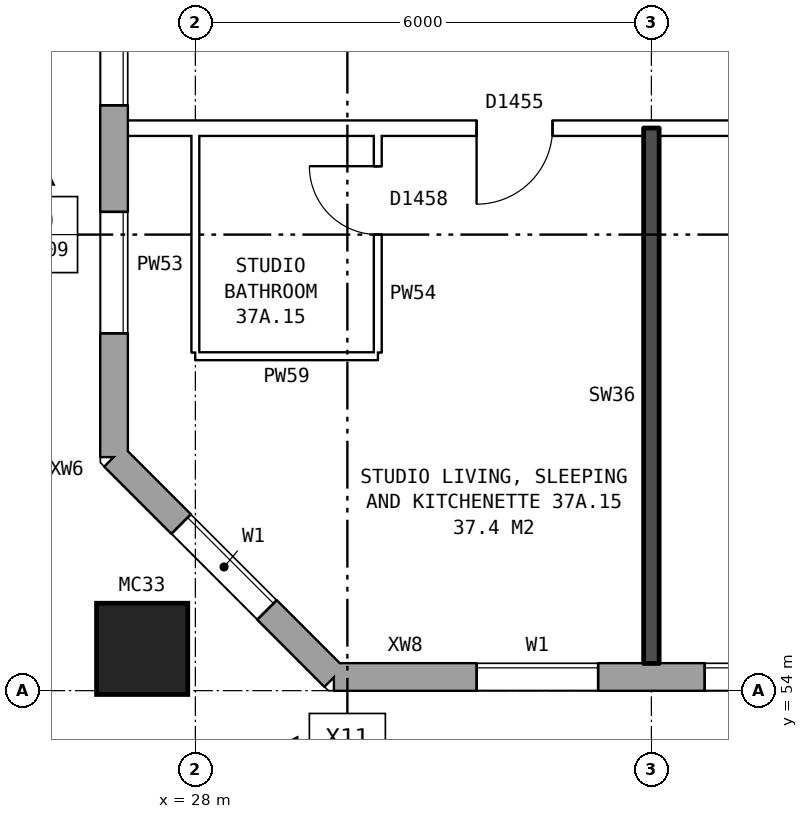
"""IFC4 building model, lengths in metres.
Left out: names, types, materials, properties, quantities, classifications, styles, units other than length and angle.
Written with IfcOpenShell. Run it as: python <this file> out.ifc"""

import sys

from ifc_helpers import new_model, si_unit, direction, frame, frame_2d, origin, origin_2d, place, context, subcontext, project, spatial, rectangle, hollow_rectangle, extrude, element, fill, save


model = new_model("IFC4")
c1 = context("Model", 3, precision=1e-05, world=origin(), true_north=direction((0.0, 1.0)))
c2 = subcontext(c1, "Body", "Model", "MODEL_VIEW")
j1 = project(units=[si_unit("LENGTHUNIT", "METRE"), si_unit("PLANEANGLEUNIT", "RADIAN")], contexts=[c1])
p1 = place(None, origin())
s1 = spatial("IfcSite", under=j1, at=p1, CompositionType="ELEMENT")
p2 = place(p1, origin())
s2 = spatial("IfcBuilding", under=s1, at=p2, CompositionType="ELEMENT")
p3 = place(p2, frame((0.0, 0.0, 133.0)))
s3 = spatial("IfcBuildingStorey", under=s2, at=p3, CompositionType="ELEMENT", Elevation=133.0)
p4 = place(p3, frame((27.3, 54.55, 0.0), z_axis=(0.0, 0.0, 1.0), x_axis=(1.0, 0.0, 0.0)))
e1 = element("IfcColumn", 1, at=p4, inside=s3, PredefinedType="COLUMN", context=c2, shape_type="SweptSolid", body=[
    extrude(hollow_rectangle(XDim=1.2, YDim=1.2, WallThickness=0.065, at=origin_2d()), origin(), (0.0, 0.0, 1.0), 3.1),
])
p5 = place(p3, frame((26.93, 57.075, 0.0), z_axis=(0.0, 0.0, 1.0), x_axis=(0.707106781187, -0.707106781187, 0.0)))
e2 = element("IfcWall", 2, at=p5, inside=s3, PredefinedType="STANDARD", context=c2, shape_type="SweptSolid", body=[
    extrude(rectangle(XDim=4.094, YDim=0.36, at=frame_2d((2.047, 0.0))), origin(), (0.0, 0.0, 1.0), 2.85),
])
p6 = place(p5, frame((1.247, 0.0, 0.8)))
e3 = element("IfcOpeningElement", 3, at=p6, cuts=e2, PredefinedType="OPENING", context=c2, shape_type="SweptSolid", body=[
    extrude(rectangle(XDim=1.6, YDim=1.8, at=frame_2d((0.8, 0.9))), frame((0.0, 0.19, 0.0), z_axis=(0.0, -1.0, 0.0), x_axis=(1.0, 0.0, 0.0)), (0.0, 0.0, 1.0), 0.38),
])
p7 = place(p3, frame((29.825, 54.18, 0.0), z_axis=(0.0, 0.0, 1.0), x_axis=(1.0, 0.0, 0.0)))
e4 = element("IfcWall", 4, at=p7, inside=s3, PredefinedType="STANDARD", context=c2, shape_type="SweptSolid", body=[
    extrude(rectangle(XDim=43.101, YDim=0.36, at=frame_2d((21.55, 0.0))), origin(), (0.0, 0.0, 1.0), 2.85),
])
p8 = place(p7, frame((1.875, 0.0, 0.8)))
e5 = element("IfcOpeningElement", 5, at=p8, cuts=e4, PredefinedType="OPENING", context=c2, shape_type="SweptSolid", body=[
    extrude(rectangle(XDim=1.6, YDim=1.8, at=frame_2d((0.8, 0.9))), frame((0.0, 0.19, 0.0), z_axis=(0.0, -1.0, 0.0), x_axis=(1.0, 0.0, 0.0)), (0.0, 0.0, 1.0), 0.38),
])
p9 = place(p7, frame((4.875, 0.0, 0.8)))
e6 = element("IfcOpeningElement", 6, at=p9, cuts=e4, PredefinedType="OPENING", context=c2, shape_type="SweptSolid", body=[
    extrude(rectangle(XDim=1.6, YDim=1.8, at=frame_2d((0.8, 0.9))), frame((0.0, 0.19, 0.0), z_axis=(0.0, -1.0, 0.0), x_axis=(1.0, 0.0, 0.0)), (0.0, 0.0, 1.0), 0.38),
])
p10 = place(p7, frame((7.875, 0.0, 0.8)))
e7 = element("IfcOpeningElement", 7, at=p10, cuts=e4, PredefinedType="OPENING", context=c2, shape_type="SweptSolid", body=[
    extrude(rectangle(XDim=1.6, YDim=1.8, at=frame_2d((0.8, 0.9))), frame((0.0, 0.19, 0.0), z_axis=(0.0, -1.0, 0.0), x_axis=(1.0, 0.0, 0.0)), (0.0, 0.0, 1.0), 0.38),
])
p11 = place(p7, frame((10.875, 0.0, 0.8)))
e8 = element("IfcOpeningElement", 8, at=p11, cuts=e4, PredefinedType="OPENING", context=c2, shape_type="SweptSolid", body=[
    extrude(rectangle(XDim=1.6, YDim=1.8, at=frame_2d((0.8, 0.9))), frame((0.0, 0.19, 0.0), z_axis=(0.0, -1.0, 0.0), x_axis=(1.0, 0.0, 0.0)), (0.0, 0.0, 1.0), 0.38),
])
p12 = place(p7, frame((14.275, 0.0, 0.8)))
e9 = element("IfcOpeningElement", 9, at=p12, cuts=e4, PredefinedType="OPENING", context=c2, shape_type="SweptSolid", body=[
    extrude(rectangle(XDim=0.8, YDim=0.9, at=frame_2d((0.4, 0.45))), frame((0.0, 0.19, 0.0), z_axis=(0.0, -1.0, 0.0), x_axis=(1.0, 0.0, 0.0)), (0.0, 0.0, 1.0), 0.38),
])
p13 = place(p7, frame((16.875, 0.0, 0.8)))
e10 = element("IfcOpeningElement", 10, at=p13, cuts=e4, PredefinedType="OPENING", context=c2, shape_type="SweptSolid", body=[
    extrude(rectangle(XDim=1.6, YDim=1.8, at=frame_2d((0.8, 0.9))), frame((0.0, 0.19, 0.0), z_axis=(0.0, -1.0, 0.0), x_axis=(1.0, 0.0, 0.0)), (0.0, 0.0, 1.0), 0.38),
])
p14 = place(p7, frame((19.875, 0.0, 0.8)))
e11 = element("IfcOpeningElement", 11, at=p14, cuts=e4, PredefinedType="OPENING", context=c2, shape_type="SweptSolid", body=[
    extrude(rectangle(XDim=1.6, YDim=1.8, at=frame_2d((0.8, 0.9))), frame((0.0, 0.19, 0.0), z_axis=(0.0, -1.0, 0.0), x_axis=(1.0, 0.0, 0.0)), (0.0, 0.0, 1.0), 0.38),
])
p15 = place(p7, frame((22.875, 0.0, 0.8)))
e12 = element("IfcOpeningElement", 12, at=p15, cuts=e4, PredefinedType="OPENING", context=c2, shape_type="SweptSolid", body=[
    extrude(rectangle(XDim=1.6, YDim=1.8, at=frame_2d((0.8, 0.9))), frame((0.0, 0.19, 0.0), z_axis=(0.0, -1.0, 0.0), x_axis=(1.0, 0.0, 0.0)), (0.0, 0.0, 1.0), 0.38),
])
p16 = place(p7, frame((25.875, 0.0, 0.8)))
e13 = element("IfcOpeningElement", 13, at=p16, cuts=e4, PredefinedType="OPENING", context=c2, shape_type="SweptSolid", body=[
    extrude(rectangle(XDim=1.6, YDim=1.8, at=frame_2d((0.8, 0.9))), frame((0.0, 0.19, 0.0), z_axis=(0.0, -1.0, 0.0), x_axis=(1.0, 0.0, 0.0)), (0.0, 0.0, 1.0), 0.38),
])
p17 = place(p7, frame((28.375, 0.0, 0.25)))
e14 = element("IfcOpeningElement", 14, at=p17, cuts=e4, PredefinedType="OPENING", context=c2, shape_type="SweptSolid", body=[
    extrude(rectangle(XDim=1.0, YDim=0.9, at=frame_2d((0.5, 0.45))), frame((0.0, 0.19, 0.0), z_axis=(0.0, -1.0, 0.0), x_axis=(1.0, 0.0, 0.0)), (0.0, 0.0, 1.0), 0.38),
])
p18 = place(p7, frame((31.875, 0.0, 0.8)))
e15 = element("IfcOpeningElement", 15, at=p18, cuts=e4, PredefinedType="OPENING", context=c2, shape_type="SweptSolid", body=[
    extrude(rectangle(XDim=1.6, YDim=1.8, at=frame_2d((0.8, 0.9))), frame((0.0, 0.19, 0.0), z_axis=(0.0, -1.0, 0.0), x_axis=(1.0, 0.0, 0.0)), (0.0, 0.0, 1.0), 0.38),
])
p19 = place(p7, frame((34.875, 0.0, 0.8)))
e16 = element("IfcOpeningElement", 16, at=p19, cuts=e4, PredefinedType="OPENING", context=c2, shape_type="SweptSolid", body=[
    extrude(rectangle(XDim=1.6, YDim=1.8, at=frame_2d((0.8, 0.9))), frame((0.0, 0.19, 0.0), z_axis=(0.0, -1.0, 0.0), x_axis=(1.0, 0.0, 0.0)), (0.0, 0.0, 1.0), 0.38),
])
p20 = place(p7, frame((37.875, 0.0, 0.8)))
e17 = element("IfcOpeningElement", 17, at=p20, cuts=e4, PredefinedType="OPENING", context=c2, shape_type="SweptSolid", body=[
    extrude(rectangle(XDim=1.6, YDim=1.8, at=frame_2d((0.8, 0.9))), frame((0.0, 0.19, 0.0), z_axis=(0.0, -1.0, 0.0), x_axis=(1.0, 0.0, 0.0)), (0.0, 0.0, 1.0), 0.38),
])
p21 = place(p7, frame((40.875, 0.0, 0.8)))
e18 = element("IfcOpeningElement", 18, at=p21, cuts=e4, PredefinedType="OPENING", context=c2, shape_type="SweptSolid", body=[
    extrude(rectangle(XDim=1.6, YDim=1.8, at=frame_2d((0.8, 0.9))), frame((0.0, 0.19, 0.0), z_axis=(0.0, -1.0, 0.0), x_axis=(1.0, 0.0, 0.0)), (0.0, 0.0, 1.0), 0.38),
])
p22 = place(p7, frame((15.375, 0.0, 0.8)))
e19 = element("IfcOpeningElement", 19, at=p22, cuts=e4, PredefinedType="OPENING", context=c2, shape_type="SweptSolid", body=[
    extrude(rectangle(XDim=0.6, YDim=1.8, at=frame_2d((0.3, 0.9))), frame((0.0, 0.19, 0.0), z_axis=(0.0, -1.0, 0.0), x_axis=(1.0, 0.0, 0.0)), (0.0, 0.0, 1.0), 0.38),
])
p23 = place(p7, frame((30.025, 0.0, 1.65)))
e20 = element("IfcOpeningElement", 20, at=p23, cuts=e4, PredefinedType="OPENING", context=c2, shape_type="SweptSolid", body=[
    extrude(rectangle(XDim=1.0, YDim=0.9, at=frame_2d((0.5, 0.45))), frame((0.0, 0.19, 0.0), z_axis=(0.0, -1.0, 0.0), x_axis=(1.0, 0.0, 0.0)), (0.0, 0.0, 1.0), 0.38),
])
p24 = place(p3, frame((26.93, 82.925, 0.0), z_axis=(0.0, 0.0, 1.0), x_axis=(0.0, -1.0, 0.0)))
e21 = element("IfcWall", 21, at=p24, inside=s3, PredefinedType="STANDARD", context=c2, shape_type="SweptSolid", body=[
    extrude(rectangle(XDim=25.851, YDim=0.36, at=frame_2d((12.925, 0.0))), origin(), (0.0, 0.0, 1.0), 2.85),
])
p25 = place(p24, frame((1.625, 0.0, 0.8)))
e22 = element("IfcOpeningElement", 22, at=p25, cuts=e21, PredefinedType="OPENING", context=c2, shape_type="SweptSolid", body=[
    extrude(rectangle(XDim=1.6, YDim=1.8, at=frame_2d((0.8, 0.9))), frame((0.0, 0.19, 0.0), z_axis=(0.0, -1.0, 0.0), x_axis=(1.0, 0.0, 0.0)), (0.0, 0.0, 1.0), 0.38),
])
p26 = place(p24, frame((4.625, 0.0, 0.8)))
e23 = element("IfcOpeningElement", 23, at=p26, cuts=e21, PredefinedType="OPENING", context=c2, shape_type="SweptSolid", body=[
    extrude(rectangle(XDim=1.6, YDim=1.8, at=frame_2d((0.8, 0.9))), frame((0.0, 0.19, 0.0), z_axis=(0.0, -1.0, 0.0), x_axis=(1.0, 0.0, 0.0)), (0.0, 0.0, 1.0), 0.38),
])
p27 = place(p24, frame((8.025, 0.0, 1.7)))
e24 = element("IfcOpeningElement", 24, at=p27, cuts=e21, PredefinedType="OPENING", context=c2, shape_type="SweptSolid", body=[
    extrude(rectangle(XDim=1.0, YDim=0.9, at=frame_2d((0.5, 0.45))), frame((0.0, 0.19, 0.0), z_axis=(0.0, -1.0, 0.0), x_axis=(1.0, 0.0, 0.0)), (0.0, 0.0, 1.0), 0.38),
])
p28 = place(p24, frame((10.625, 0.0, 0.8)))
e25 = element("IfcOpeningElement", 25, at=p28, cuts=e21, PredefinedType="OPENING", context=c2, shape_type="SweptSolid", body=[
    extrude(rectangle(XDim=1.6, YDim=1.8, at=frame_2d((0.8, 0.9))), frame((0.0, 0.19, 0.0), z_axis=(0.0, -1.0, 0.0), x_axis=(1.0, 0.0, 0.0)), (0.0, 0.0, 1.0), 0.38),
])
p29 = place(p24, frame((13.625, 0.0, 0.8)))
e26 = element("IfcOpeningElement", 26, at=p29, cuts=e21, PredefinedType="OPENING", context=c2, shape_type="SweptSolid", body=[
    extrude(rectangle(XDim=1.6, YDim=1.8, at=frame_2d((0.8, 0.9))), frame((0.0, 0.19, 0.0), z_axis=(0.0, -1.0, 0.0), x_axis=(1.0, 0.0, 0.0)), (0.0, 0.0, 1.0), 0.38),
])
p30 = place(p24, frame((9.325, 0.0, 0.8)))
e27 = element("IfcOpeningElement", 27, at=p30, cuts=e21, PredefinedType="OPENING", context=c2, shape_type="SweptSolid", body=[
    extrude(rectangle(XDim=1.0, YDim=1.8, at=frame_2d((0.5, 0.9))), frame((0.0, 0.19, 0.0), z_axis=(0.0, -1.0, 0.0), x_axis=(1.0, 0.0, 0.0)), (0.0, 0.0, 1.0), 0.38),
])
p31 = place(p24, frame((19.625, 0.0, 0.8)))
e28 = element("IfcOpeningElement", 28, at=p31, cuts=e21, PredefinedType="OPENING", context=c2, shape_type="SweptSolid", body=[
    extrude(rectangle(XDim=1.6, YDim=1.8, at=frame_2d((0.8, 0.9))), frame((0.0, 0.19, 0.0), z_axis=(0.0, -1.0, 0.0), x_axis=(1.0, 0.0, 0.0)), (0.0, 0.0, 1.0), 0.38),
])
p32 = place(p24, frame((22.625, 0.0, 0.8)))
e29 = element("IfcOpeningElement", 29, at=p32, cuts=e21, PredefinedType="OPENING", context=c2, shape_type="SweptSolid", body=[
    extrude(rectangle(XDim=1.6, YDim=1.8, at=frame_2d((0.8, 0.9))), frame((0.0, 0.19, 0.0), z_axis=(0.0, -1.0, 0.0), x_axis=(1.0, 0.0, 0.0)), (0.0, 0.0, 1.0), 0.38),
])
p33 = place(p24, frame((12.525, 0.0, 0.8)))
e30 = element("IfcOpeningElement", 30, at=p33, cuts=e21, PredefinedType="OPENING", context=c2, shape_type="SweptSolid", body=[
    extrude(rectangle(XDim=0.8, YDim=1.8, at=frame_2d((0.4, 0.9))), frame((0.0, 0.19, 0.0), z_axis=(0.0, -1.0, 0.0), x_axis=(1.0, 0.0, 0.0)), (0.0, 0.0, 1.0), 0.38),
])
p34 = place(p24, frame((15.525, 0.0, 0.8)))
e31 = element("IfcOpeningElement", 31, at=p34, cuts=e21, PredefinedType="OPENING", context=c2, shape_type="SweptSolid", body=[
    extrude(rectangle(XDim=1.0, YDim=1.8, at=frame_2d((0.5, 0.9))), frame((0.0, 0.19, 0.0), z_axis=(0.0, -1.0, 0.0), x_axis=(1.0, 0.0, 0.0)), (0.0, 0.0, 1.0), 0.38),
])
p35 = place(p24, frame((16.825, 0.0, 1.7)))
e32 = element("IfcOpeningElement", 32, at=p35, cuts=e21, PredefinedType="OPENING", context=c2, shape_type="SweptSolid", body=[
    extrude(rectangle(XDim=1.0, YDim=0.9, at=frame_2d((0.5, 0.45))), frame((0.0, 0.19, 0.0), z_axis=(0.0, -1.0, 0.0), x_axis=(1.0, 0.0, 0.0)), (0.0, 0.0, 1.0), 0.38),
])
p36 = place(p3, frame((28.0, 58.4, 0.0), z_axis=(0.0, 0.0, 1.0), x_axis=(1.0, 0.0, 0.0)))
e33 = element("IfcWall", 33, at=p36, inside=s3, PredefinedType="PARTITIONING", context=c2, shape_type="SweptSolid", body=[
    extrude(rectangle(XDim=2.4, YDim=0.1, at=frame_2d((1.2, 0.0))), origin(), (0.0, 0.0, 1.0), 2.85),
])
p37 = place(p3, frame((27.11, 61.4, 0.0), z_axis=(0.0, 0.0, 1.0), x_axis=(1.0, 0.0, 0.0)))
e34 = element("IfcWall", 34, at=p37, inside=s3, PredefinedType="PARTITIONING", context=c2, shape_type="SweptSolid", body=[
    extrude(rectangle(XDim=18.79, YDim=0.2, at=frame_2d((9.395, 0.0))), origin(), (0.0, 0.0, 1.0), 2.85),
])
p38 = place(p37, frame((14.19, 0.0, 0.0)))
e35 = element("IfcOpeningElement", 35, at=p38, cuts=e34, PredefinedType="OPENING", context=c2, shape_type="SweptSolid", body=[
    extrude(rectangle(XDim=1.0, YDim=2.1, at=frame_2d((0.5, 1.05))), frame((0.0, 0.11, 0.0), z_axis=(0.0, -1.0, 0.0), x_axis=(1.0, 0.0, 0.0)), (0.0, 0.0, 1.0), 0.22),
])
p39 = place(p37, frame((8.19, 0.0, 0.0)))
e36 = element("IfcOpeningElement", 36, at=p39, cuts=e34, PredefinedType="OPENING", context=c2, shape_type="SweptSolid", body=[
    extrude(rectangle(XDim=1.0, YDim=2.1, at=frame_2d((0.5, 1.05))), frame((0.0, 0.11, 0.0), z_axis=(0.0, -1.0, 0.0), x_axis=(1.0, 0.0, 0.0)), (0.0, 0.0, 1.0), 0.22),
])
p40 = place(p37, frame((4.59, 0.0, 0.0)))
e37 = element("IfcOpeningElement", 37, at=p40, cuts=e34, PredefinedType="OPENING", context=c2, shape_type="SweptSolid", body=[
    extrude(rectangle(XDim=1.0, YDim=2.1, at=frame_2d((0.5, 1.05))), frame((0.0, 0.11, 0.0), z_axis=(0.0, -1.0, 0.0), x_axis=(1.0, 0.0, 0.0)), (0.0, 0.0, 1.0), 0.22),
])
p41 = place(p3, frame((28.0, 58.45, 0.0), z_axis=(0.0, 0.0, 1.0), x_axis=(0.0, 1.0, 0.0)))
e38 = element("IfcWall", 38, at=p41, inside=s3, PredefinedType="PARTITIONING", context=c2, shape_type="SweptSolid", body=[
    extrude(rectangle(XDim=2.85, YDim=0.1, at=frame_2d((1.425, 0.0))), origin(), (0.0, 0.0, 1.0), 2.85),
])
p42 = place(p3, frame((30.4, 58.45, 0.0), z_axis=(0.0, 0.0, 1.0), x_axis=(0.0, 1.0, 0.0)))
e39 = element("IfcWall", 39, at=p42, inside=s3, PredefinedType="PARTITIONING", context=c2, shape_type="SweptSolid", body=[
    extrude(rectangle(XDim=2.85, YDim=0.1, at=frame_2d((1.425, 0.0))), origin(), (0.0, 0.0, 1.0), 2.85),
])
p43 = place(p42, frame((1.55, 0.0, 0.0)))
e40 = element("IfcOpeningElement", 40, at=p43, cuts=e39, PredefinedType="OPENING", context=c2, shape_type="SweptSolid", body=[
    extrude(rectangle(XDim=0.9, YDim=2.1, at=frame_2d((0.45, 1.05))), frame((0.0, 0.06, 0.0), z_axis=(0.0, -1.0, 0.0), x_axis=(1.0, 0.0, 0.0)), (0.0, 0.0, 1.0), 0.12),
])
p44 = place(p3, frame((34.0, 54.36, 0.0), z_axis=(0.0, 0.0, 1.0), x_axis=(0.0, 1.0, 0.0)))
e41 = element("IfcWall", 41, at=p44, inside=s3, PredefinedType="SOLIDWALL", context=c2, shape_type="SweptSolid", body=[
    extrude(rectangle(XDim=7.04, YDim=0.2, at=frame_2d((3.52, 0.0))), origin(), (0.0, 0.0, 1.0), 2.85),
])
p45 = place(p6, origin())
e42 = element("IfcWindow", 42, at=p45, inside=s3, PartitioningType="SINGLE_PANEL", PredefinedType="WINDOW", context=c2, shape_type="SweptSolid", body=[
    extrude(rectangle(XDim=1.6, YDim=1.8, at=frame_2d((0.8, 0.9))), frame((0.0, 0.15, 0.0), z_axis=(0.0, -1.0, 0.0), x_axis=(1.0, 0.0, 0.0)), (0.0, 0.0, 1.0), 0.06),
])
fill(e3, e42)
p46 = place(p8, origin())
e43 = element("IfcWindow", 43, at=p46, inside=s3, PartitioningType="SINGLE_PANEL", PredefinedType="WINDOW", context=c2, shape_type="SweptSolid", body=[
    extrude(rectangle(XDim=1.6, YDim=1.8, at=frame_2d((0.8, 0.9))), frame((0.0, 0.15, 0.0), z_axis=(0.0, -1.0, 0.0), x_axis=(1.0, 0.0, 0.0)), (0.0, 0.0, 1.0), 0.06),
])
fill(e5, e43)
p47 = place(p9, origin())
e44 = element("IfcWindow", 44, at=p47, inside=s3, PartitioningType="SINGLE_PANEL", PredefinedType="WINDOW", context=c2, shape_type="SweptSolid", body=[
    extrude(rectangle(XDim=1.6, YDim=1.8, at=frame_2d((0.8, 0.9))), frame((0.0, 0.15, 0.0), z_axis=(0.0, -1.0, 0.0), x_axis=(1.0, 0.0, 0.0)), (0.0, 0.0, 1.0), 0.06),
])
fill(e6, e44)
p48 = place(p31, origin())
e45 = element("IfcWindow", 45, at=p48, inside=s3, PartitioningType="SINGLE_PANEL", PredefinedType="WINDOW", context=c2, shape_type="SweptSolid", body=[
    extrude(rectangle(XDim=1.6, YDim=1.8, at=frame_2d((0.8, 0.9))), frame((0.0, 0.15, 0.0), z_axis=(0.0, -1.0, 0.0), x_axis=(1.0, 0.0, 0.0)), (0.0, 0.0, 1.0), 0.06),
])
fill(e28, e45)
p49 = place(p32, origin())
e46 = element("IfcWindow", 46, at=p49, inside=s3, PartitioningType="SINGLE_PANEL", PredefinedType="WINDOW", context=c2, shape_type="SweptSolid", body=[
    extrude(rectangle(XDim=1.6, YDim=1.8, at=frame_2d((0.8, 0.9))), frame((0.0, 0.15, 0.0), z_axis=(0.0, -1.0, 0.0), x_axis=(1.0, 0.0, 0.0)), (0.0, 0.0, 1.0), 0.06),
])
fill(e29, e46)
p50 = place(p40, frame((1.0, 0.0, 0.0), z_axis=(0.0, 0.0, 1.0), x_axis=(-1.0, 0.0, 0.0)))
e47 = element("IfcDoor", 47, at=p50, inside=s3, OperationType="SINGLE_SWING_RIGHT", PredefinedType="DOOR", context=c2, shape_type="SweptSolid", body=[
    extrude(rectangle(XDim=1.0, YDim=2.1, at=frame_2d((0.5, 1.05))), frame((0.0, 0.025, 0.0), z_axis=(0.0, -1.0, 0.0), x_axis=(1.0, 0.0, 0.0)), (0.0, 0.0, 1.0), 0.05),
])
fill(e37, e47)
p51 = place(p43, origin())
e48 = element("IfcDoor", 48, at=p51, inside=s3, OperationType="SINGLE_SWING_RIGHT", PredefinedType="DOOR", context=c2, shape_type="SweptSolid", body=[
    extrude(rectangle(XDim=0.9, YDim=2.1, at=frame_2d((0.45, 1.05))), frame((0.0, 0.025, 0.0), z_axis=(0.0, -1.0, 0.0), x_axis=(1.0, 0.0, 0.0)), (0.0, 0.0, 1.0), 0.05),
])
fill(e40, e48)
save(model, sys.argv[1])
